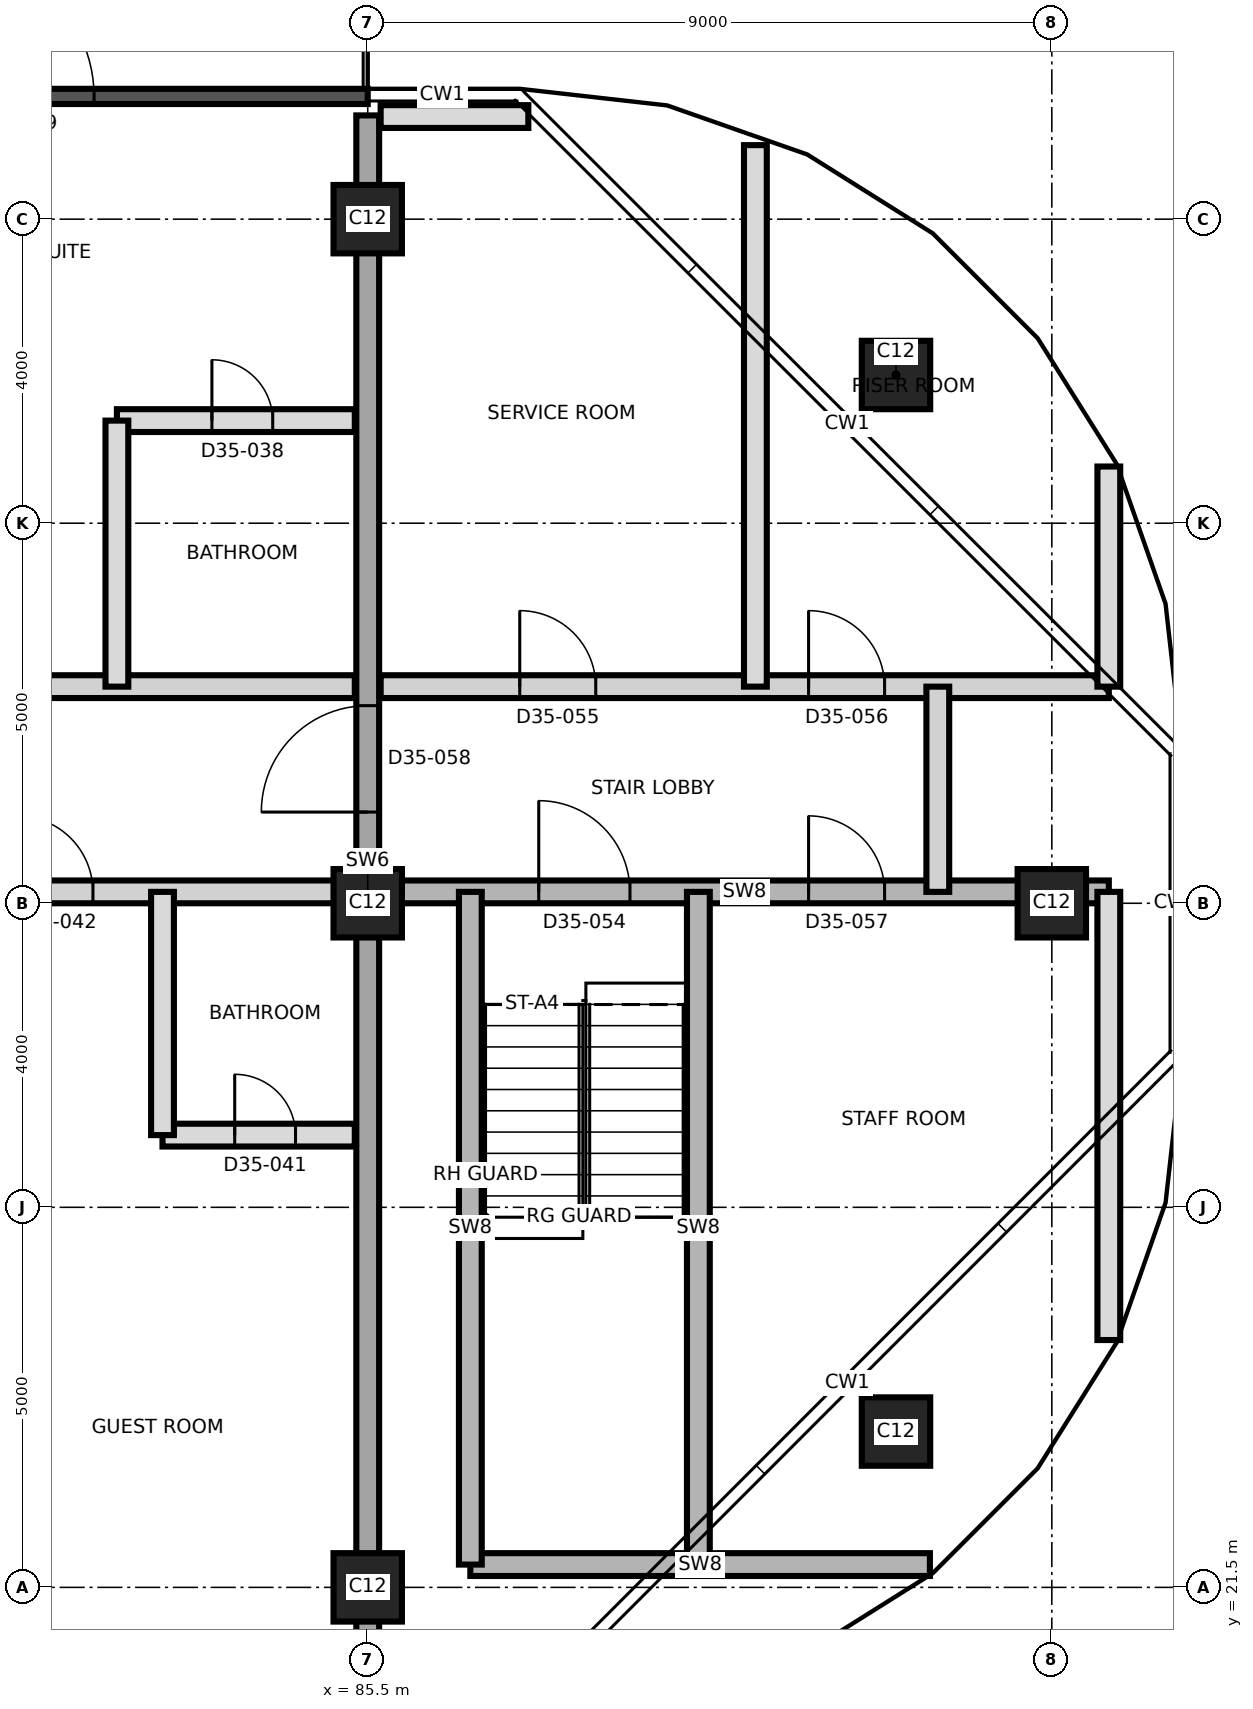
"""IFC4 building model, lengths in metres.
Left out: names, types, materials, properties, quantities, classifications, styles, units other than length and angle.
Written with IfcOpenShell. Run it as: python <this file> out.ifc"""

import sys

from ifc_helpers import new_model, si_unit, direction, frame, frame_2d, origin, origin_2d, place, context, subcontext, project, spatial, rectangle, extrude, element, fill, save


model = new_model("IFC4")
c1 = context("Model", 3, precision=1e-05, world=origin(), true_north=direction((0.0, 1.0)))
c2 = subcontext(c1, "Body", "Model", "MODEL_VIEW")
j1 = project(units=[si_unit("LENGTHUNIT", "METRE"), si_unit("PLANEANGLEUNIT", "RADIAN")], contexts=[c1])
p1 = place(None, origin())
s1 = spatial("IfcSite", under=j1, at=p1, CompositionType="ELEMENT")
p2 = place(p1, origin())
s2 = spatial("IfcBuilding", under=s1, at=p2, CompositionType="ELEMENT")
p3 = place(p2, frame((0.0, 0.0, 195.8)))
s3 = spatial("IfcBuildingStorey", under=s2, at=p3, CompositionType="ELEMENT", Elevation=195.8)
for number, where, z_axis, x_axis in (
    (1, (85.5, 21.5, 0.0), (0.0, 0.0, 1.0), (1.0, 0.0, 0.0)),
    (2, (92.45, 23.55, 0.0), (0.0, 0.0, 1.0), (1.0, 0.0, 0.0)),
    (3, (85.5, 30.5, 0.0), (0.0, 0.0, 1.0), (1.0, 0.0, 0.0)),
    (4, (94.5, 30.5, 0.0), (0.0, 0.0, 1.0), (1.0, 0.0, 0.0)),
    (5, (92.45, 37.45, 0.0), (0.0, 0.0, 1.0), (1.0, 0.0, 0.0)),
    (6, (85.5, 39.5, 0.0), (0.0, 0.0, 1.0), (1.0, 0.0, 0.0)),
):
    element("IfcColumn", number, at=place(p3, frame(where, z_axis=z_axis, x_axis=x_axis)), inside=s3, PredefinedType="COLUMN", context=c2, shape_type="SweptSolid", body=[
        extrude(rectangle(XDim=0.9, YDim=0.9, at=origin_2d()), origin(), (0.0, 0.0, 1.0), 3.7),
    ])
p4 = place(p3, frame((85.5, 20.135, 0.0), z_axis=(0.0, 0.0, 1.0), x_axis=(0.0, 1.0, 0.0)))
e7 = element("IfcWall", 7, at=p4, inside=s3, PredefinedType="SHEAR", context=c2, shape_type="SweptSolid", body=[
    extrude(rectangle(XDim=20.73, YDim=0.3, at=frame_2d((10.365, 0.0))), origin(), (0.0, 0.0, 1.0), 3.7),
])
p5 = place(p4, frame((11.565, 0.0, 0.0)))
e8 = element("IfcOpeningElement", 8, at=p5, cuts=e7, PredefinedType="OPENING", context=c2, shape_type="SweptSolid", body=[
    extrude(rectangle(XDim=1.4, YDim=2.1, at=frame_2d((0.7, 1.05))), frame((0.0, 0.16, 0.0), z_axis=(0.0, -1.0, 0.0), x_axis=(1.0, 0.0, 0.0)), (0.0, 0.0, 1.0), 0.32),
])
p6 = place(p3, frame((67.5, 41.115, 0.0), z_axis=(0.0, 0.0, 1.0), x_axis=(1.0, 0.0, 0.0)))
e9 = element("IfcWall", 9, at=p6, inside=s3, PredefinedType="SOLIDWALL", context=c2, shape_type="SweptSolid", body=[
    extrude(rectangle(XDim=18.0, YDim=0.2, at=frame_2d((9.0, 0.0))), origin(), (0.0, 0.0, 1.0), 3.4),
])
p7 = place(p6, frame((12.6, 0.0, 0.0)))
e10 = element("IfcOpeningElement", 10, at=p7, cuts=e9, PredefinedType="OPENING", context=c2, shape_type="SweptSolid", body=[
    extrude(rectangle(XDim=1.8, YDim=2.4, at=frame_2d((0.9, 1.2))), frame((0.0, 0.11, 0.0), z_axis=(0.0, -1.0, 0.0), x_axis=(1.0, 0.0, 0.0)), (0.0, 0.0, 1.0), 0.22),
])
p8 = place(p6, frame((10.8, 0.0, 0.9)))
e11 = element("IfcOpeningElement", 11, at=p8, cuts=e9, PredefinedType="OPENING", context=c2, shape_type="SweptSolid", body=[
    extrude(rectangle(XDim=1.2, YDim=2.1, at=frame_2d((0.6, 1.05))), frame((0.0, 0.11, 0.0), z_axis=(0.0, -1.0, 0.0), x_axis=(1.0, 0.0, 0.0)), (0.0, 0.0, 1.0), 0.22),
])
p9 = place(p6, frame((6.0, 0.0, 0.9)))
e12 = element("IfcOpeningElement", 12, at=p9, cuts=e9, PredefinedType="OPENING", context=c2, shape_type="SweptSolid", body=[
    extrude(rectangle(XDim=1.2, YDim=2.1, at=frame_2d((0.6, 1.05))), frame((0.0, 0.11, 0.0), z_axis=(0.0, -1.0, 0.0), x_axis=(1.0, 0.0, 0.0)), (0.0, 0.0, 1.0), 0.22),
])
p10 = place(p6, frame((3.6, 0.0, 0.0)))
e13 = element("IfcOpeningElement", 13, at=p10, cuts=e9, PredefinedType="OPENING", context=c2, shape_type="SweptSolid", body=[
    extrude(rectangle(XDim=1.8, YDim=2.4, at=frame_2d((0.9, 1.2))), frame((0.0, 0.11, 0.0), z_axis=(0.0, -1.0, 0.0), x_axis=(1.0, 0.0, 0.0)), (0.0, 0.0, 1.0), 0.22),
])
p11 = place(p3, frame((86.85, 21.8, 0.0), z_axis=(0.0, 0.0, 1.0), x_axis=(1.0, 0.0, 0.0)))
e14 = element("IfcWall", 14, at=p11, inside=s3, PredefinedType="SHEAR", context=c2, shape_type="SweptSolid", body=[
    extrude(rectangle(XDim=6.046, YDim=0.3, at=frame_2d((3.023, 0.0))), origin(), (0.0, 0.0, 1.0), 3.4),
])
p12 = place(p3, frame((82.8, 27.45, 0.0), z_axis=(0.0, 0.0, 1.0), x_axis=(1.0, 0.0, 0.0)))
e15 = element("IfcWall", 15, at=p12, inside=s3, PredefinedType="PARTITIONING", context=c2, shape_type="SweptSolid", body=[
    extrude(rectangle(XDim=2.53, YDim=0.3, at=frame_2d((1.265, 0.0))), origin(), (0.0, 0.0, 1.0), 3.4),
])
p13 = place(p12, frame((0.95, 0.0, 0.0)))
e16 = element("IfcOpeningElement", 16, at=p13, cuts=e15, PredefinedType="OPENING", context=c2, shape_type="SweptSolid", body=[
    extrude(rectangle(XDim=0.8, YDim=2.1, at=frame_2d((0.4, 1.05))), frame((0.0, 0.16, 0.0), z_axis=(0.0, -1.0, 0.0), x_axis=(1.0, 0.0, 0.0)), (0.0, 0.0, 1.0), 0.32),
])
p14 = place(p3, frame((58.55, 30.65, 0.0), z_axis=(0.0, 0.0, 1.0), x_axis=(1.0, 0.0, 0.0)))
e17 = element("IfcWall", 17, at=p14, inside=s3, PredefinedType="PARTITIONING", context=c2, shape_type="SweptSolid", body=[
    extrude(rectangle(XDim=26.78, YDim=0.3, at=frame_2d((13.39, 0.0))), origin(), (0.0, 0.0, 1.0), 3.4),
])
p15 = place(p14, frame((1.65, 0.0, 0.0)))
e18 = element("IfcOpeningElement", 18, at=p15, cuts=e17, PredefinedType="OPENING", context=c2, shape_type="SweptSolid", body=[
    extrude(rectangle(XDim=1.2, YDim=2.1, at=frame_2d((0.6, 1.05))), frame((0.0, 0.16, 0.0), z_axis=(0.0, -1.0, 0.0), x_axis=(1.0, 0.0, 0.0)), (0.0, 0.0, 1.0), 0.32),
])
p16 = place(p14, frame((4.9, 0.0, 0.0)))
e19 = element("IfcOpeningElement", 19, at=p16, cuts=e17, PredefinedType="OPENING", context=c2, shape_type="SweptSolid", body=[
    extrude(rectangle(XDim=1.0, YDim=2.1, at=frame_2d((0.5, 1.05))), frame((0.0, 0.16, 0.0), z_axis=(0.0, -1.0, 0.0), x_axis=(1.0, 0.0, 0.0)), (0.0, 0.0, 1.0), 0.32),
])
p17 = place(p14, frame((10.085, 0.0, 0.0)))
e20 = element("IfcOpeningElement", 20, at=p17, cuts=e17, PredefinedType="OPENING", context=c2, shape_type="SweptSolid", body=[
    extrude(rectangle(XDim=1.2, YDim=2.1, at=frame_2d((0.6, 1.05))), frame((0.0, 0.16, 0.0), z_axis=(0.0, -1.0, 0.0), x_axis=(1.0, 0.0, 0.0)), (0.0, 0.0, 1.0), 0.32),
])
p18 = place(p14, frame((13.335, 0.0, 0.0)))
e21 = element("IfcOpeningElement", 21, at=p18, cuts=e17, PredefinedType="OPENING", context=c2, shape_type="SweptSolid", body=[
    extrude(rectangle(XDim=1.0, YDim=2.1, at=frame_2d((0.5, 1.05))), frame((0.0, 0.16, 0.0), z_axis=(0.0, -1.0, 0.0), x_axis=(1.0, 0.0, 0.0)), (0.0, 0.0, 1.0), 0.32),
])
p19 = place(p14, frame((19.085, 0.0, 0.0)))
e22 = element("IfcOpeningElement", 22, at=p19, cuts=e17, PredefinedType="OPENING", context=c2, shape_type="SweptSolid", body=[
    extrude(rectangle(XDim=1.2, YDim=2.1, at=frame_2d((0.6, 1.05))), frame((0.0, 0.16, 0.0), z_axis=(0.0, -1.0, 0.0), x_axis=(1.0, 0.0, 0.0)), (0.0, 0.0, 1.0), 0.32),
])
p20 = place(p14, frame((22.335, 0.0, 0.0)))
e23 = element("IfcOpeningElement", 23, at=p20, cuts=e17, PredefinedType="OPENING", context=c2, shape_type="SweptSolid", body=[
    extrude(rectangle(XDim=1.0, YDim=2.1, at=frame_2d((0.5, 1.05))), frame((0.0, 0.16, 0.0), z_axis=(0.0, -1.0, 0.0), x_axis=(1.0, 0.0, 0.0)), (0.0, 0.0, 1.0), 0.32),
])
p21 = place(p3, frame((85.67, 30.65, 0.0), z_axis=(0.0, 0.0, 1.0), x_axis=(1.0, 0.0, 0.0)))
e24 = element("IfcWall", 24, at=p21, inside=s3, PredefinedType="SHEAR", context=c2, shape_type="SweptSolid", body=[
    extrude(rectangle(XDim=9.58, YDim=0.3, at=frame_2d((4.79, 0.0))), origin(), (0.0, 0.0, 1.0), 3.4),
])
p22 = place(p21, frame((2.08, 0.0, 0.0)))
e25 = element("IfcOpeningElement", 25, at=p22, cuts=e24, PredefinedType="OPENING", context=c2, shape_type="SweptSolid", body=[
    extrude(rectangle(XDim=1.2, YDim=2.1, at=frame_2d((0.6, 1.05))), frame((0.0, 0.16, 0.0), z_axis=(0.0, -1.0, 0.0), x_axis=(1.0, 0.0, 0.0)), (0.0, 0.0, 1.0), 0.32),
])
p23 = place(p21, frame((5.63, 0.0, 0.0)))
e26 = element("IfcOpeningElement", 26, at=p23, cuts=e24, PredefinedType="OPENING", context=c2, shape_type="SweptSolid", body=[
    extrude(rectangle(XDim=1.0, YDim=2.1, at=frame_2d((0.5, 1.05))), frame((0.0, 0.16, 0.0), z_axis=(0.0, -1.0, 0.0), x_axis=(1.0, 0.0, 0.0)), (0.0, 0.0, 1.0), 0.32),
])
p24 = place(p3, frame((58.55, 33.35, 0.0), z_axis=(0.0, 0.0, 1.0), x_axis=(1.0, 0.0, 0.0)))
e27 = element("IfcWall", 27, at=p24, inside=s3, PredefinedType="PARTITIONING", context=c2, shape_type="SweptSolid", body=[
    extrude(rectangle(XDim=26.78, YDim=0.3, at=frame_2d((13.39, 0.0))), origin(), (0.0, 0.0, 1.0), 3.4),
])
p25 = place(p24, frame((1.1, 0.0, 0.0)))
e28 = element("IfcOpeningElement", 28, at=p25, cuts=e27, PredefinedType="OPENING", context=c2, shape_type="SweptSolid", body=[
    extrude(rectangle(XDim=1.0, YDim=2.1, at=frame_2d((0.5, 1.05))), frame((0.0, 0.16, 0.0), z_axis=(0.0, -1.0, 0.0), x_axis=(1.0, 0.0, 0.0)), (0.0, 0.0, 1.0), 0.32),
])
p26 = place(p24, frame((6.95, 0.0, 0.0)))
e29 = element("IfcOpeningElement", 29, at=p26, cuts=e27, PredefinedType="OPENING", context=c2, shape_type="SweptSolid", body=[
    extrude(rectangle(XDim=1.0, YDim=2.1, at=frame_2d((0.5, 1.05))), frame((0.0, 0.16, 0.0), z_axis=(0.0, -1.0, 0.0), x_axis=(1.0, 0.0, 0.0)), (0.0, 0.0, 1.0), 0.32),
])
p27 = place(p24, frame((14.4, 0.0, 0.0)))
e30 = element("IfcOpeningElement", 30, at=p27, cuts=e27, PredefinedType="OPENING", context=c2, shape_type="SweptSolid", body=[
    extrude(rectangle(XDim=1.4, YDim=2.4, at=frame_2d((0.7, 1.2))), frame((0.0, 0.16, 0.0), z_axis=(0.0, -1.0, 0.0), x_axis=(1.0, 0.0, 0.0)), (0.0, 0.0, 1.0), 0.32),
])
p28 = place(p24, frame((20.3, 0.0, 0.0)))
e31 = element("IfcOpeningElement", 31, at=p28, cuts=e27, PredefinedType="OPENING", context=c2, shape_type="SweptSolid", body=[
    extrude(rectangle(XDim=1.0, YDim=2.4, at=frame_2d((0.5, 1.2))), frame((0.0, 0.16, 0.0), z_axis=(0.0, -1.0, 0.0), x_axis=(1.0, 0.0, 0.0)), (0.0, 0.0, 1.0), 0.32),
])
p29 = place(p3, frame((85.67, 33.35, 0.0), z_axis=(0.0, 0.0, 1.0), x_axis=(1.0, 0.0, 0.0)))
e32 = element("IfcWall", 32, at=p29, inside=s3, PredefinedType="PARTITIONING", context=c2, shape_type="SweptSolid", body=[
    extrude(rectangle(XDim=9.58, YDim=0.3, at=frame_2d((4.79, 0.0))), origin(), (0.0, 0.0, 1.0), 3.4),
])
p30 = place(p29, frame((1.83, 0.0, 0.0)))
e33 = element("IfcOpeningElement", 33, at=p30, cuts=e32, PredefinedType="OPENING", context=c2, shape_type="SweptSolid", body=[
    extrude(rectangle(XDim=1.0, YDim=2.1, at=frame_2d((0.5, 1.05))), frame((0.0, 0.16, 0.0), z_axis=(0.0, -1.0, 0.0), x_axis=(1.0, 0.0, 0.0)), (0.0, 0.0, 1.0), 0.32),
])
p31 = place(p29, frame((5.63, 0.0, 0.0)))
e34 = element("IfcOpeningElement", 34, at=p31, cuts=e32, PredefinedType="OPENING", context=c2, shape_type="SweptSolid", body=[
    extrude(rectangle(XDim=1.0, YDim=2.1, at=frame_2d((0.5, 1.05))), frame((0.0, 0.16, 0.0), z_axis=(0.0, -1.0, 0.0), x_axis=(1.0, 0.0, 0.0)), (0.0, 0.0, 1.0), 0.32),
])
p32 = place(p3, frame((82.2, 36.85, 0.0), z_axis=(0.0, 0.0, 1.0), x_axis=(1.0, 0.0, 0.0)))
e35 = element("IfcWall", 35, at=p32, inside=s3, PredefinedType="PARTITIONING", context=c2, shape_type="SweptSolid", body=[
    extrude(rectangle(XDim=3.13, YDim=0.3, at=frame_2d((1.565, 0.0))), origin(), (0.0, 0.0, 1.0), 3.4),
])
p33 = place(p32, frame((1.25, 0.0, 0.0)))
e36 = element("IfcOpeningElement", 36, at=p33, cuts=e35, PredefinedType="OPENING", context=c2, shape_type="SweptSolid", body=[
    extrude(rectangle(XDim=0.8, YDim=2.1, at=frame_2d((0.4, 1.05))), frame((0.0, 0.16, 0.0), z_axis=(0.0, -1.0, 0.0), x_axis=(1.0, 0.0, 0.0)), (0.0, 0.0, 1.0), 0.32),
])
p34 = place(p3, frame((85.67, 40.85, 0.0), z_axis=(0.0, 0.0, 1.0), x_axis=(1.0, 0.0, 0.0)))
e37 = element("IfcWall", 37, at=p34, inside=s3, PredefinedType="PARTITIONING", context=c2, shape_type="SweptSolid", body=[
    extrude(rectangle(XDim=1.943, YDim=0.3, at=frame_2d((0.972, 0.0))), origin(), (0.0, 0.0, 1.0), 3.4),
])
p35 = place(p3, frame((82.2, 33.35, 0.0), z_axis=(0.0, 0.0, 1.0), x_axis=(0.0, 1.0, 0.0)))
e38 = element("IfcWall", 38, at=p35, inside=s3, PredefinedType="PARTITIONING", context=c2, shape_type="SweptSolid", body=[
    extrude(rectangle(XDim=3.5, YDim=0.3, at=frame_2d((1.75, 0.0))), origin(), (0.0, 0.0, 1.0), 3.4),
])
p36 = place(p3, frame((82.8, 27.45, 0.0), z_axis=(0.0, 0.0, 1.0), x_axis=(0.0, 1.0, 0.0)))
e39 = element("IfcWall", 39, at=p36, inside=s3, PredefinedType="PARTITIONING", context=c2, shape_type="SweptSolid", body=[
    extrude(rectangle(XDim=3.2, YDim=0.3, at=frame_2d((1.6, 0.0))), origin(), (0.0, 0.0, 1.0), 3.4),
])
for number, where, z_axis, x_axis in (
    (40, (86.85, 21.8, 0.0), (0.0, 0.0, 1.0), (0.0, 1.0, 0.0)),
    (41, (89.85, 21.8, 0.0), (0.0, 0.0, 1.0), (0.0, 1.0, 0.0)),
):
    element("IfcWall", number, at=place(p3, frame(where, z_axis=z_axis, x_axis=x_axis)), inside=s3, PredefinedType="SHEAR", context=c2, shape_type="SweptSolid", body=[
        extrude(rectangle(XDim=8.85, YDim=0.3, at=frame_2d((4.425, 0.0))), origin(), (0.0, 0.0, 1.0), 3.4),
    ])
p37 = place(p3, frame((90.6, 33.35, 0.0), z_axis=(0.0, 0.0, 1.0), x_axis=(0.0, 1.0, 0.0)))
e42 = element("IfcWall", 42, at=p37, inside=s3, PredefinedType="PARTITIONING", context=c2, shape_type="SweptSolid", body=[
    extrude(rectangle(XDim=7.124, YDim=0.3, at=frame_2d((3.562, 0.0))), origin(), (0.0, 0.0, 1.0), 3.4),
])
p38 = place(p3, frame((93.0, 30.65, 0.0), z_axis=(0.0, 0.0, 1.0), x_axis=(0.0, 1.0, 0.0)))
e43 = element("IfcWall", 43, at=p38, inside=s3, PredefinedType="PARTITIONING", context=c2, shape_type="SweptSolid", body=[
    extrude(rectangle(XDim=2.7, YDim=0.3, at=frame_2d((1.35, 0.0))), origin(), (0.0, 0.0, 1.0), 3.4),
])
p39 = place(p3, frame((95.25, 24.754, 0.0), z_axis=(0.0, 0.0, 1.0), x_axis=(0.0, 1.0, 0.0)))
e44 = element("IfcWall", 44, at=p39, inside=s3, PredefinedType="PARTITIONING", context=c2, shape_type="SweptSolid", body=[
    extrude(rectangle(XDim=5.896, YDim=0.3, at=frame_2d((2.948, 0.0))), origin(), (0.0, 0.0, 1.0), 3.4),
])
p40 = place(p3, frame((95.25, 33.35, 0.0), z_axis=(0.0, 0.0, 1.0), x_axis=(0.0, 1.0, 0.0)))
e45 = element("IfcWall", 45, at=p40, inside=s3, PredefinedType="PARTITIONING", context=c2, shape_type="SweptSolid", body=[
    extrude(rectangle(XDim=2.896, YDim=0.3, at=frame_2d((1.448, 0.0))), origin(), (0.0, 0.0, 1.0), 3.4),
])
p41 = place(p7, origin())
e46 = element("IfcDoor", 46, at=p41, inside=s3, OperationType="SINGLE_SWING_LEFT", PredefinedType="DOOR", context=c2, shape_type="SweptSolid", body=[
    extrude(rectangle(XDim=1.8, YDim=2.4, at=frame_2d((0.9, 1.2))), frame((0.0, 0.025, 0.0), z_axis=(0.0, -1.0, 0.0), x_axis=(1.0, 0.0, 0.0)), (0.0, 0.0, 1.0), 0.05),
])
fill(e10, e46)
p42 = place(p33, origin())
e47 = element("IfcDoor", 47, at=p42, inside=s3, OperationType="SINGLE_SWING_LEFT", PredefinedType="DOOR", context=c2, shape_type="SweptSolid", body=[
    extrude(rectangle(XDim=0.8, YDim=2.1, at=frame_2d((0.4, 1.05))), frame((0.0, 0.025, 0.0), z_axis=(0.0, -1.0, 0.0), x_axis=(1.0, 0.0, 0.0)), (0.0, 0.0, 1.0), 0.05),
])
fill(e36, e47)
p43 = place(p13, origin())
e48 = element("IfcDoor", 48, at=p43, inside=s3, OperationType="SINGLE_SWING_LEFT", PredefinedType="DOOR", context=c2, shape_type="SweptSolid", body=[
    extrude(rectangle(XDim=0.8, YDim=2.1, at=frame_2d((0.4, 1.05))), frame((0.0, 0.025, 0.0), z_axis=(0.0, -1.0, 0.0), x_axis=(1.0, 0.0, 0.0)), (0.0, 0.0, 1.0), 0.05),
])
fill(e16, e48)
p44 = place(p20, origin())
e49 = element("IfcDoor", 49, at=p44, inside=s3, OperationType="SINGLE_SWING_RIGHT", PredefinedType="DOOR", context=c2, shape_type="SweptSolid", body=[
    extrude(rectangle(XDim=1.0, YDim=2.1, at=frame_2d((0.5, 1.05))), frame((0.0, 0.025, 0.0), z_axis=(0.0, -1.0, 0.0), x_axis=(1.0, 0.0, 0.0)), (0.0, 0.0, 1.0), 0.05),
])
fill(e23, e49)
p45 = place(p22, origin())
e50 = element("IfcDoor", 50, at=p45, inside=s3, OperationType="SINGLE_SWING_LEFT", PredefinedType="DOOR", context=c2, shape_type="SweptSolid", body=[
    extrude(rectangle(XDim=1.2, YDim=2.1, at=frame_2d((0.6, 1.05))), frame((0.0, 0.025, 0.0), z_axis=(0.0, -1.0, 0.0), x_axis=(1.0, 0.0, 0.0)), (0.0, 0.0, 1.0), 0.05),
])
fill(e25, e50)
p46 = place(p30, origin())
e51 = element("IfcDoor", 51, at=p46, inside=s3, OperationType="SINGLE_SWING_LEFT", PredefinedType="DOOR", context=c2, shape_type="SweptSolid", body=[
    extrude(rectangle(XDim=1.0, YDim=2.1, at=frame_2d((0.5, 1.05))), frame((0.0, 0.025, 0.0), z_axis=(0.0, -1.0, 0.0), x_axis=(1.0, 0.0, 0.0)), (0.0, 0.0, 1.0), 0.05),
])
fill(e33, e51)
p47 = place(p31, origin())
e52 = element("IfcDoor", 52, at=p47, inside=s3, OperationType="SINGLE_SWING_RIGHT", PredefinedType="DOOR", context=c2, shape_type="SweptSolid", body=[
    extrude(rectangle(XDim=1.0, YDim=2.1, at=frame_2d((0.5, 1.05))), frame((0.0, 0.025, 0.0), z_axis=(0.0, -1.0, 0.0), x_axis=(1.0, 0.0, 0.0)), (0.0, 0.0, 1.0), 0.05),
])
fill(e34, e52)
p48 = place(p23, origin())
e53 = element("IfcDoor", 53, at=p48, inside=s3, OperationType="SINGLE_SWING_LEFT", PredefinedType="DOOR", context=c2, shape_type="SweptSolid", body=[
    extrude(rectangle(XDim=1.0, YDim=2.1, at=frame_2d((0.5, 1.05))), frame((0.0, 0.025, 0.0), z_axis=(0.0, -1.0, 0.0), x_axis=(1.0, 0.0, 0.0)), (0.0, 0.0, 1.0), 0.05),
])
fill(e26, e53)
p49 = place(p5, origin())
e54 = element("IfcDoor", 54, at=p49, inside=s3, OperationType="SINGLE_SWING_RIGHT", PredefinedType="DOOR", context=c2, shape_type="SweptSolid", body=[
    extrude(rectangle(XDim=1.4, YDim=2.1, at=frame_2d((0.7, 1.05))), frame((0.0, 0.025, 0.0), z_axis=(0.0, -1.0, 0.0), x_axis=(1.0, 0.0, 0.0)), (0.0, 0.0, 1.0), 0.05),
])
fill(e8, e54)
save(model, sys.argv[1])
